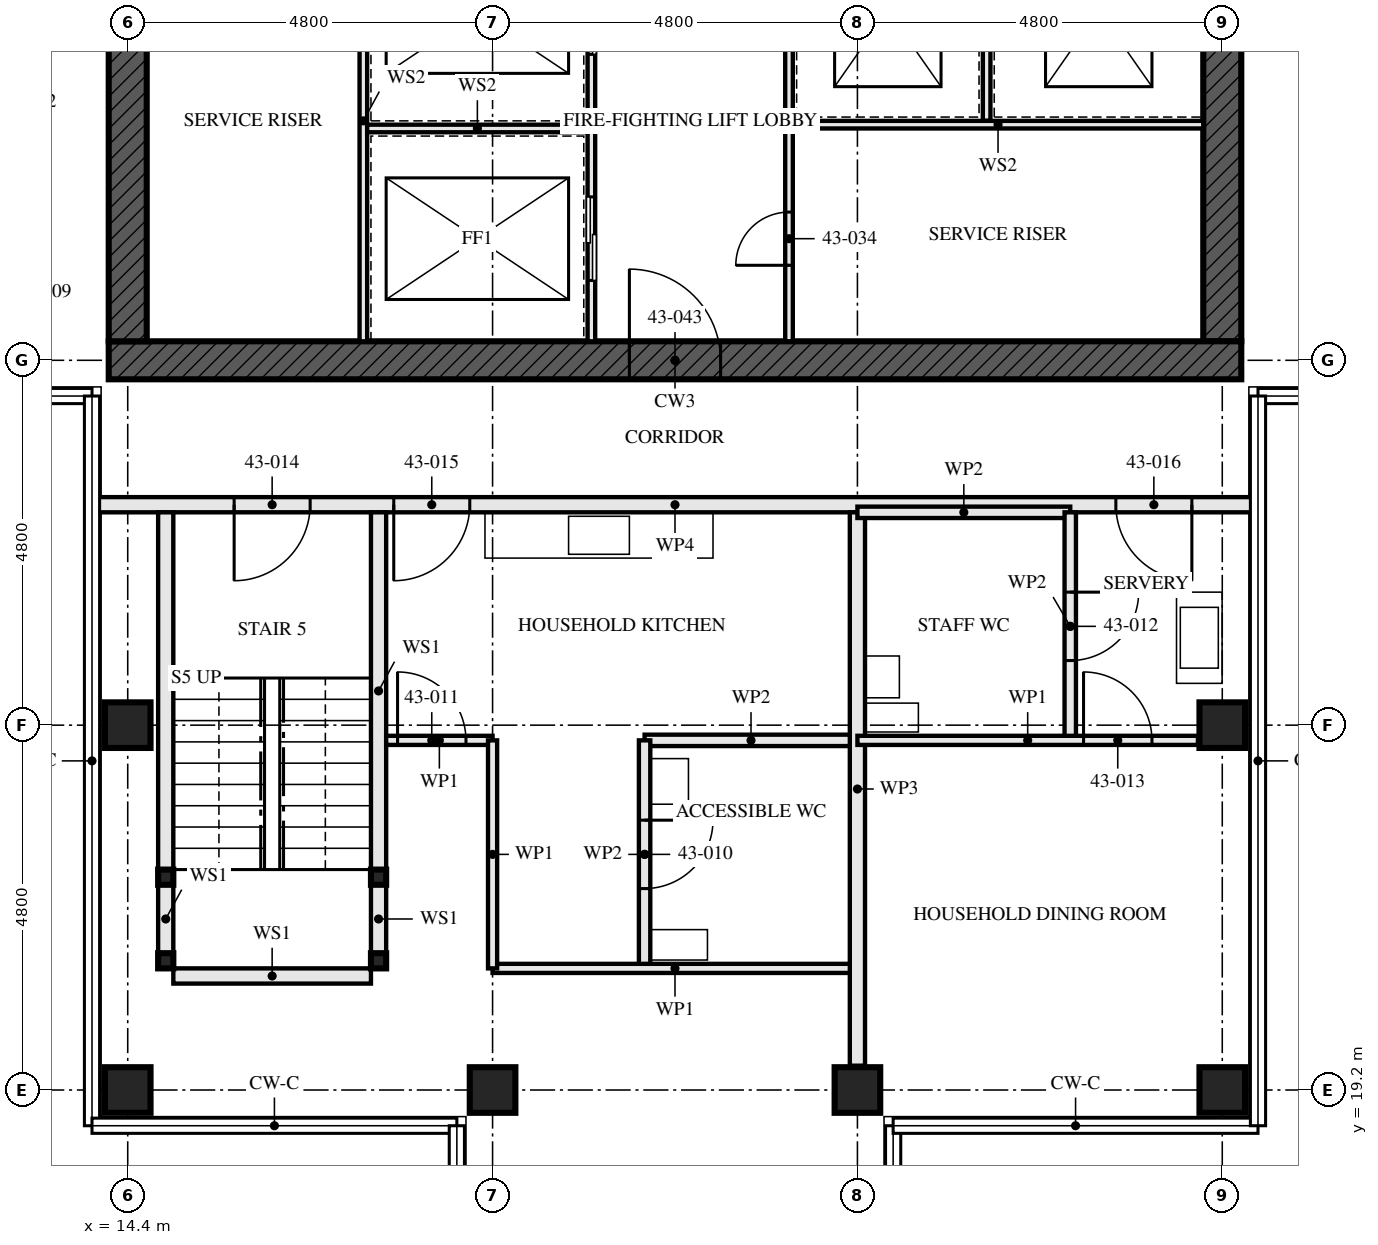
"""IFC4 building model, lengths in metres.
Left out: names, types, materials, properties, quantities, classifications, styles, units other than length and angle.
Written with IfcOpenShell. Run it as: python <this file> out.ifc"""

import sys

from ifc_helpers import new_model, si_unit, direction, frame, frame_2d, origin, origin_2d, place, context, subcontext, project, spatial, rectangle, hollow_rectangle, extrude, element, fill, save


model = new_model("IFC4")
c1 = context("Model", 3, precision=1e-05, world=origin(), true_north=direction((0.0, 1.0)))
c2 = subcontext(c1, "Body", "Model", "MODEL_VIEW")
j1 = project(units=[si_unit("LENGTHUNIT", "METRE"), si_unit("PLANEANGLEUNIT", "RADIAN")], contexts=[c1])
p1 = place(None, origin())
s1 = spatial("IfcSite", under=j1, at=p1, CompositionType="ELEMENT")
p2 = place(p1, origin())
s2 = spatial("IfcBuilding", under=s1, at=p2, CompositionType="ELEMENT")
p3 = place(p2, frame((0.0, 0.0, 158.5)))
s3 = spatial("IfcBuildingStorey", under=s2, at=p3, CompositionType="ELEMENT", Elevation=158.5)
p4 = place(p3, frame((14.4, 19.2, 0.0), z_axis=(0.0, 0.0, 1.0), x_axis=(0.0, 1.0, 0.0)))
e1 = element("IfcColumn", 1, at=p4, inside=s3, PredefinedType="COLUMN", context=c2, shape_type="SweptSolid", body=[
    extrude(hollow_rectangle(XDim=0.6, YDim=0.6, WallThickness=0.06, at=origin_2d()), origin(), (0.0, 0.0, 1.0), 3.5),
])
p5 = place(p3, frame((14.4, 24.0, 0.0), z_axis=(0.0, 0.0, 1.0), x_axis=(1.0, 0.0, 0.0)))
e2 = element("IfcColumn", 2, at=p5, inside=s3, PredefinedType="COLUMN", context=c2, shape_type="SweptSolid", body=[
    extrude(hollow_rectangle(XDim=0.6, YDim=0.6, WallThickness=0.08, at=origin_2d()), origin(), (0.0, 0.0, 1.0), 3.5),
])
for number, where, z_axis, x_axis in (
    (3, (19.2, 19.2, 0.0), (0.0, 0.0, 1.0), (0.0, 1.0, 0.0)),
    (4, (24.0, 19.2, 0.0), (0.0, 0.0, 1.0), (0.0, 1.0, 0.0)),
    (5, (28.8, 19.2, 0.0), (0.0, 0.0, 1.0), (0.0, 1.0, 0.0)),
):
    element("IfcColumn", number, at=place(p3, frame(where, z_axis=z_axis, x_axis=x_axis)), inside=s3, PredefinedType="COLUMN", context=c2, shape_type="SweptSolid", body=[
        extrude(hollow_rectangle(XDim=0.6, YDim=0.6, WallThickness=0.06, at=origin_2d()), origin(), (0.0, 0.0, 1.0), 3.5),
    ])
p6 = place(p3, frame((28.8, 24.0, 0.0), z_axis=(0.0, 0.0, 1.0), x_axis=(1.0, 0.0, 0.0)))
e6 = element("IfcColumn", 6, at=p6, inside=s3, PredefinedType="COLUMN", context=c2, shape_type="SweptSolid", body=[
    extrude(hollow_rectangle(XDim=0.6, YDim=0.6, WallThickness=0.08, at=origin_2d()), origin(), (0.0, 0.0, 1.0), 3.5),
])
p7 = place(p3, frame((14.15, 28.8, -0.17), z_axis=(0.0, 0.0, 1.0), x_axis=(1.0, 0.0, 0.0)))
e7 = element("IfcWall", 7, at=p7, inside=s3, PredefinedType="SHEAR", context=c2, shape_type="SweptSolid", body=[
    extrude(rectangle(XDim=14.9, YDim=0.5, at=frame_2d((7.45, 0.0))), origin(), (0.0, 0.0, 1.0), 3.5),
])
p8 = place(p7, frame((6.85, 0.0, 0.17)))
e8 = element("IfcOpeningElement", 8, at=p8, cuts=e7, PredefinedType="OPENING", context=c2, shape_type="SweptSolid", body=[
    extrude(rectangle(XDim=1.2, YDim=2.1, at=frame_2d((0.6, 1.05))), frame((0.0, 0.26, 0.0), z_axis=(0.0, -1.0, 0.0), x_axis=(1.0, 0.0, 0.0)), (0.0, 0.0, 1.0), 0.521),
])
p9 = place(p3, frame((14.4, 42.95, -0.17), z_axis=(0.0, 0.0, 1.0), x_axis=(0.0, -1.0, 0.0)))
e9 = element("IfcWall", 9, at=p9, inside=s3, PredefinedType="SHEAR", context=c2, shape_type="SweptSolid", body=[
    extrude(rectangle(XDim=13.9, YDim=0.5, at=frame_2d((6.95, 0.0))), origin(), (0.0, 0.0, 1.0), 3.5),
])
p10 = place(p9, frame((6.35, 0.0, 0.17)))
e10 = element("IfcOpeningElement", 10, at=p10, cuts=e9, PredefinedType="OPENING", context=c2, shape_type="SweptSolid", body=[
    extrude(rectangle(XDim=1.2, YDim=2.1, at=frame_2d((0.6, 1.05))), frame((0.0, 0.26, 0.0), z_axis=(0.0, -1.0, 0.0), x_axis=(1.0, 0.0, 0.0)), (0.0, 0.0, 1.0), 0.521),
])
p11 = place(p3, frame((28.8, 29.05, -0.17), z_axis=(0.0, 0.0, 1.0), x_axis=(0.0, 1.0, 0.0)))
e11 = element("IfcWall", 11, at=p11, inside=s3, PredefinedType="SHEAR", context=c2, shape_type="SweptSolid", body=[
    extrude(rectangle(XDim=13.9, YDim=0.5, at=frame_2d((6.95, 0.0))), origin(), (0.0, 0.0, 1.0), 3.5),
])
p12 = place(p11, frame((6.35, 0.0, 0.17)))
e12 = element("IfcOpeningElement", 12, at=p12, cuts=e11, PredefinedType="OPENING", context=c2, shape_type="SweptSolid", body=[
    extrude(rectangle(XDim=1.2, YDim=2.1, at=frame_2d((0.6, 1.05))), frame((0.0, 0.26, 0.0), z_axis=(0.0, -1.0, 0.0), x_axis=(1.0, 0.0, 0.0)), (0.0, 0.0, 1.0), 0.521),
])
for number, where, z_axis, x_axis in (
    (13, (14.9, 20.9, 0.0), (0.0, 0.0, 1.0), (1.0, 0.0, 0.0)),
    (14, (17.7, 20.9, 0.0), (0.0, 0.0, 1.0), (1.0, 0.0, 0.0)),
    (15, (14.9, 22.0, 0.0), (0.0, 0.0, 1.0), (1.0, 0.0, 0.0)),
    (16, (17.7, 22.0, 0.0), (0.0, 0.0, 1.0), (1.0, 0.0, 0.0)),
):
    element("IfcColumn", number, at=place(p3, frame(where, z_axis=z_axis, x_axis=x_axis)), inside=s3, PredefinedType="COLUMN", context=c2, shape_type="SweptSolid", body=[
        extrude(hollow_rectangle(XDim=0.2, YDim=0.2, WallThickness=0.008, at=origin_2d()), origin(), (0.0, 0.0, 1.0), 3.33),
    ])
p13 = place(p3, frame((14.9, 21.0, 0.0), z_axis=(0.0, 0.0, 1.0), x_axis=(0.0, 1.0, 0.0)))
e17 = element("IfcWall", 17, at=p13, inside=s3, PredefinedType="SOLIDWALL", context=c2, shape_type="SweptSolid", body=[
    extrude(rectangle(XDim=0.9, YDim=0.2, at=frame_2d((0.45, 0.0))), origin(), (0.0, 0.0, 1.0), 2.99),
])
p14 = place(p3, frame((14.9, 22.1, 0.0), z_axis=(0.0, 0.0, 1.0), x_axis=(0.0, 1.0, 0.0)))
e18 = element("IfcWall", 18, at=p14, inside=s3, PredefinedType="SOLIDWALL", context=c2, shape_type="SweptSolid", body=[
    extrude(rectangle(XDim=4.7, YDim=0.2, at=frame_2d((2.35, 0.0))), origin(), (0.0, 0.0, 1.0), 2.99),
])
p15 = place(p3, frame((17.7, 21.0, 0.0), z_axis=(0.0, 0.0, 1.0), x_axis=(0.0, 1.0, 0.0)))
e19 = element("IfcWall", 19, at=p15, inside=s3, PredefinedType="SOLIDWALL", context=c2, shape_type="SweptSolid", body=[
    extrude(rectangle(XDim=0.9, YDim=0.2, at=frame_2d((0.45, 0.0))), origin(), (0.0, 0.0, 1.0), 2.99),
])
p16 = place(p3, frame((17.7, 22.1, 0.0), z_axis=(0.0, 0.0, 1.0), x_axis=(0.0, 1.0, 0.0)))
e20 = element("IfcWall", 20, at=p16, inside=s3, PredefinedType="SOLIDWALL", context=c2, shape_type="SweptSolid", body=[
    extrude(rectangle(XDim=4.7, YDim=0.2, at=frame_2d((2.35, 0.0))), origin(), (0.0, 0.0, 1.0), 2.99),
])
p17 = place(p3, frame((15.0, 20.7, 0.0), z_axis=(0.0, 0.0, 1.0), x_axis=(1.0, 0.0, 0.0)))
e21 = element("IfcWall", 21, at=p17, inside=s3, PredefinedType="SOLIDWALL", context=c2, shape_type="SweptSolid", body=[
    extrude(rectangle(XDim=2.6, YDim=0.2, at=frame_2d((1.3, 0.0))), origin(), (0.0, 0.0, 1.0), 3.33),
])
p18 = place(p3, frame((21.2, 20.8, 0.0), z_axis=(0.0, 0.0, 1.0), x_axis=(0.0, 1.0, 0.0)))
e22 = element("IfcWall", 22, at=p18, inside=s3, PredefinedType="PARTITIONING", context=c2, shape_type="SweptSolid", body=[
    extrude(rectangle(XDim=3.0, YDim=0.15, at=frame_2d((1.5, 0.0))), origin(), (0.0, 0.0, 1.0), 3.33),
])
p19 = place(p18, frame((1.05, 0.0, 0.0)))
e23 = element("IfcOpeningElement", 23, at=p19, cuts=e22, PredefinedType="OPENING", context=c2, shape_type="SweptSolid", body=[
    extrude(rectangle(XDim=0.9, YDim=2.1, at=frame_2d((0.45, 1.05))), frame((0.0, 0.085, 0.0), z_axis=(0.0, -1.0, 0.0), x_axis=(1.0, 0.0, 0.0)), (0.0, 0.0, 1.0), 0.171),
])
p20 = place(p3, frame((21.2, 23.8, 0.0), z_axis=(0.0, 0.0, 1.0), x_axis=(1.0, 0.0, 0.0)))
e24 = element("IfcWall", 24, at=p20, inside=s3, PredefinedType="PARTITIONING", context=c2, shape_type="SweptSolid", body=[
    extrude(rectangle(XDim=2.8, YDim=0.15, at=frame_2d((1.4, 0.0))), origin(), (0.0, 0.0, 1.0), 3.33),
])
p21 = place(p3, frame((17.8, 23.8, 0.0), z_axis=(0.0, 0.0, 1.0), x_axis=(1.0, 0.0, 0.0)))
e25 = element("IfcWall", 25, at=p21, inside=s3, PredefinedType="PARTITIONING", context=c2, shape_type="SweptSolid", body=[
    extrude(rectangle(XDim=1.4, YDim=0.12, at=frame_2d((0.7, 0.0))), origin(), (0.0, 0.0, 1.0), 3.33),
])
p22 = place(p21, frame((0.15, 0.0, 0.0)))
e26 = element("IfcOpeningElement", 26, at=p22, cuts=e25, PredefinedType="OPENING", context=c2, shape_type="SweptSolid", body=[
    extrude(rectangle(XDim=0.9, YDim=2.1, at=frame_2d((0.45, 1.05))), frame((0.0, 0.071, 0.0), z_axis=(0.0, -1.0, 0.0), x_axis=(1.0, 0.0, 0.0)), (0.0, 0.0, 1.0), 0.141),
])
p23 = place(p3, frame((19.2, 20.8, 0.0), z_axis=(0.0, 0.0, 1.0), x_axis=(1.0, 0.0, 0.0)))
e27 = element("IfcWall", 27, at=p23, inside=s3, PredefinedType="PARTITIONING", context=c2, shape_type="SweptSolid", body=[
    extrude(rectangle(XDim=4.8, YDim=0.12, at=frame_2d((2.4, 0.0))), origin(), (0.0, 0.0, 1.0), 3.33),
])
p24 = place(p3, frame((19.2, 20.8, 0.0), z_axis=(0.0, 0.0, 1.0), x_axis=(0.0, 1.0, 0.0)))
e28 = element("IfcWall", 28, at=p24, inside=s3, PredefinedType="PARTITIONING", context=c2, shape_type="SweptSolid", body=[
    extrude(rectangle(XDim=3.0, YDim=0.12, at=frame_2d((1.5, 0.0))), origin(), (0.0, 0.0, 1.0), 2.55),
])
p25 = place(p3, frame((24.0, 19.52, 0.0), z_axis=(0.0, 0.0, 1.0), x_axis=(0.0, 1.0, 0.0)))
e29 = element("IfcWall", 29, at=p25, inside=s3, PredefinedType="PARTITIONING", context=c2, shape_type="SweptSolid", body=[
    extrude(rectangle(XDim=7.28, YDim=0.2, at=frame_2d((3.64, 0.0))), origin(), (0.0, 0.0, 1.0), 2.55),
])
p26 = place(p3, frame((26.8, 23.8, 0.0), z_axis=(0.0, 0.0, 1.0), x_axis=(0.0, 1.0, 0.0)))
e30 = element("IfcWall", 30, at=p26, inside=s3, PredefinedType="PARTITIONING", context=c2, shape_type="SweptSolid", body=[
    extrude(rectangle(XDim=3.0, YDim=0.15, at=frame_2d((1.5, 0.0))), origin(), (0.0, 0.0, 1.0), 2.55),
])
p27 = place(p26, frame((1.05, 0.0, 0.0)))
e31 = element("IfcOpeningElement", 31, at=p27, cuts=e30, PredefinedType="OPENING", context=c2, shape_type="SweptSolid", body=[
    extrude(rectangle(XDim=0.9, YDim=2.1, at=frame_2d((0.45, 1.05))), frame((0.0, 0.085, 0.0), z_axis=(0.0, -1.0, 0.0), x_axis=(1.0, 0.0, 0.0)), (0.0, 0.0, 1.0), 0.171),
])
p28 = place(p3, frame((24.0, 26.8, 0.0), z_axis=(0.0, 0.0, 1.0), x_axis=(1.0, 0.0, 0.0)))
e32 = element("IfcWall", 32, at=p28, inside=s3, PredefinedType="PARTITIONING", context=c2, shape_type="SweptSolid", body=[
    extrude(rectangle(XDim=2.8, YDim=0.15, at=frame_2d((1.4, 0.0))), origin(), (0.0, 0.0, 1.0), 3.33),
])
p29 = place(p3, frame((24.0, 23.8, 0.0), z_axis=(0.0, 0.0, 1.0), x_axis=(1.0, 0.0, 0.0)))
e33 = element("IfcWall", 33, at=p29, inside=s3, PredefinedType="PARTITIONING", context=c2, shape_type="SweptSolid", body=[
    extrude(rectangle(XDim=4.48, YDim=0.12, at=frame_2d((2.24, 0.0))), origin(), (0.0, 0.0, 1.0), 3.33),
])
p30 = place(p29, frame((2.975, 0.0, 0.0)))
e34 = element("IfcOpeningElement", 34, at=p30, cuts=e33, PredefinedType="OPENING", context=c2, shape_type="SweptSolid", body=[
    extrude(rectangle(XDim=0.9, YDim=2.1, at=frame_2d((0.45, 1.05))), frame((0.0, 0.071, 0.0), z_axis=(0.0, -1.0, 0.0), x_axis=(1.0, 0.0, 0.0)), (0.0, 0.0, 1.0), 0.141),
])
p31 = place(p3, frame((13.95, 26.9, 0.0), z_axis=(0.0, 0.0, 1.0), x_axis=(1.0, 0.0, 0.0)))
e35 = element("IfcWall", 35, at=p31, inside=s3, PredefinedType="PARTITIONING", context=c2, shape_type="SweptSolid", body=[
    extrude(rectangle(XDim=15.3, YDim=0.2, at=frame_2d((7.65, 0.0))), origin(), (0.0, 0.0, 1.0), 2.32),
])
p32 = place(p31, frame((1.85, 0.0, 0.0)))
e36 = element("IfcOpeningElement", 36, at=p32, cuts=e35, PredefinedType="OPENING", context=c2, shape_type="SweptSolid", body=[
    extrude(rectangle(XDim=1.0, YDim=2.1, at=frame_2d((0.5, 1.05))), frame((0.0, 0.111, 0.0), z_axis=(0.0, -1.0, 0.0), x_axis=(1.0, 0.0, 0.0)), (0.0, 0.0, 1.0), 0.221),
])
p33 = place(p31, frame((3.95, 0.0, 0.0)))
e37 = element("IfcOpeningElement", 37, at=p33, cuts=e35, PredefinedType="OPENING", context=c2, shape_type="SweptSolid", body=[
    extrude(rectangle(XDim=1.0, YDim=2.1, at=frame_2d((0.5, 1.05))), frame((0.0, 0.111, 0.0), z_axis=(0.0, -1.0, 0.0), x_axis=(1.0, 0.0, 0.0)), (0.0, 0.0, 1.0), 0.221),
])
p34 = place(p31, frame((13.45, 0.0, 0.0)))
e38 = element("IfcOpeningElement", 38, at=p34, cuts=e35, PredefinedType="OPENING", context=c2, shape_type="SweptSolid", body=[
    extrude(rectangle(XDim=1.0, YDim=2.1, at=frame_2d((0.5, 1.05))), frame((0.0, 0.111, 0.0), z_axis=(0.0, -1.0, 0.0), x_axis=(1.0, 0.0, 0.0)), (0.0, 0.0, 1.0), 0.221),
])
p35 = place(p3, frame((20.5, 29.05, 0.0), z_axis=(0.0, 0.0, 1.0), x_axis=(0.0, 1.0, 0.0)))
e39 = element("IfcWall", 39, at=p35, inside=s3, PredefinedType="SOLIDWALL", context=c2, shape_type="SweptSolid", body=[
    extrude(rectangle(XDim=5.8, YDim=0.1, at=frame_2d((2.9, 0.0))), origin(), (0.0, 0.0, 1.0), 3.33),
])
p36 = place(p35, frame((0.8, 0.0, 0.0)))
e40 = element("IfcOpeningElement", 40, at=p36, cuts=e39, PredefinedType="OPENING", context=c2, shape_type="SweptSolid", body=[
    extrude(rectangle(XDim=1.1, YDim=2.3, at=frame_2d((0.55, 1.15))), frame((0.0, 0.061, 0.0), z_axis=(0.0, -1.0, 0.0), x_axis=(1.0, 0.0, 0.0)), (0.0, 0.0, 1.0), 0.121),
])
p37 = place(p35, frame((3.775, 0.0, 0.0)))
e41 = element("IfcOpeningElement", 41, at=p37, cuts=e39, PredefinedType="OPENING", context=c2, shape_type="SweptSolid", body=[
    extrude(rectangle(XDim=1.1, YDim=2.3, at=frame_2d((0.55, 1.15))), frame((0.0, 0.061, 0.0), z_axis=(0.0, -1.0, 0.0), x_axis=(1.0, 0.0, 0.0)), (0.0, 0.0, 1.0), 0.121),
])
p38 = place(p3, frame((23.1, 29.05, 0.0), z_axis=(0.0, 0.0, 1.0), x_axis=(0.0, 1.0, 0.0)))
e42 = element("IfcWall", 42, at=p38, inside=s3, PredefinedType="SOLIDWALL", context=c2, shape_type="SweptSolid", body=[
    extrude(rectangle(XDim=5.8, YDim=0.1, at=frame_2d((2.9, 0.0))), origin(), (0.0, 0.0, 1.0), 3.33),
])
p39 = place(p38, frame((1.0, 0.0, 0.0)))
e43 = element("IfcOpeningElement", 43, at=p39, cuts=e42, PredefinedType="OPENING", context=c2, shape_type="SweptSolid", body=[
    extrude(rectangle(XDim=0.7, YDim=2.1, at=frame_2d((0.35, 1.05))), frame((0.0, 0.061, 0.0), z_axis=(0.0, -1.0, 0.0), x_axis=(1.0, 0.0, 0.0)), (0.0, 0.0, 1.0), 0.121),
])
p40 = place(p3, frame((17.5, 29.05, 0.0), z_axis=(0.0, 0.0, 1.0), x_axis=(0.0, 1.0, 0.0)))
e44 = element("IfcWall", 44, at=p40, inside=s3, PredefinedType="SOLIDWALL", context=c2, shape_type="SweptSolid", body=[
    extrude(rectangle(XDim=5.8, YDim=0.1, at=frame_2d((2.9, 0.0))), origin(), (0.0, 0.0, 1.0), 3.33),
])
p41 = place(p3, frame((17.55, 31.85, 0.0), z_axis=(0.0, 0.0, 1.0), x_axis=(1.0, 0.0, 0.0)))
e45 = element("IfcWall", 45, at=p41, inside=s3, PredefinedType="SOLIDWALL", context=c2, shape_type="SweptSolid", body=[
    extrude(rectangle(XDim=2.9, YDim=0.1, at=frame_2d((1.45, 0.0))), origin(), (0.0, 0.0, 1.0), 3.33),
])
p42 = place(p3, frame((25.7, 31.95, 0.0), z_axis=(0.0, 0.0, 1.0), x_axis=(0.0, 1.0, 0.0)))
e46 = element("IfcWall", 46, at=p42, inside=s3, PredefinedType="SOLIDWALL", context=c2, shape_type="SweptSolid", body=[
    extrude(rectangle(XDim=2.9, YDim=0.1, at=frame_2d((1.45, 0.0))), origin(), (0.0, 0.0, 1.0), 3.33),
])
p43 = place(p3, frame((23.15, 31.9, 0.0), z_axis=(0.0, 0.0, 1.0), x_axis=(1.0, 0.0, 0.0)))
e47 = element("IfcWall", 47, at=p43, inside=s3, PredefinedType="SOLIDWALL", context=c2, shape_type="SweptSolid", body=[
    extrude(rectangle(XDim=5.4, YDim=0.1, at=frame_2d((2.7, 0.0))), origin(), (0.0, 0.0, 1.0), 3.33),
])
p44 = place(p19, frame((0.9, 0.0, 0.0), z_axis=(0.0, 0.0, 1.0), x_axis=(-1.0, 0.0, 0.0)))
e48 = element("IfcDoor", 48, at=p44, inside=s3, OperationType="SINGLE_SWING_RIGHT", PredefinedType="DOOR", context=c2, shape_type="SweptSolid", body=[
    extrude(rectangle(XDim=0.9, YDim=2.1, at=frame_2d((0.45, 1.05))), frame((0.0, 0.022, 0.0), z_axis=(0.0, -1.0, 0.0), x_axis=(1.0, 0.0, 0.0)), (0.0, 0.0, 1.0), 0.044),
])
fill(e23, e48)
p45 = place(p22, origin())
e49 = element("IfcDoor", 49, at=p45, inside=s3, OperationType="SINGLE_SWING_RIGHT", PredefinedType="DOOR", context=c2, shape_type="SweptSolid", body=[
    extrude(rectangle(XDim=0.9, YDim=2.1, at=frame_2d((0.45, 1.05))), frame((0.0, 0.022, 0.0), z_axis=(0.0, -1.0, 0.0), x_axis=(1.0, 0.0, 0.0)), (0.0, 0.0, 1.0), 0.044),
])
fill(e26, e49)
p46 = place(p27, frame((0.9, 0.0, 0.0), z_axis=(0.0, 0.0, 1.0), x_axis=(-1.0, 0.0, 0.0)))
e50 = element("IfcDoor", 50, at=p46, inside=s3, OperationType="SINGLE_SWING_RIGHT", PredefinedType="DOOR", context=c2, shape_type="SweptSolid", body=[
    extrude(rectangle(XDim=0.9, YDim=2.1, at=frame_2d((0.45, 1.05))), frame((0.0, 0.022, 0.0), z_axis=(0.0, -1.0, 0.0), x_axis=(1.0, 0.0, 0.0)), (0.0, 0.0, 1.0), 0.044),
])
fill(e31, e50)
p47 = place(p30, origin())
e51 = element("IfcDoor", 51, at=p47, inside=s3, OperationType="SINGLE_SWING_RIGHT", PredefinedType="DOOR", context=c2, shape_type="SweptSolid", body=[
    extrude(rectangle(XDim=0.9, YDim=2.1, at=frame_2d((0.45, 1.05))), frame((0.0, 0.022, 0.0), z_axis=(0.0, -1.0, 0.0), x_axis=(1.0, 0.0, 0.0)), (0.0, 0.0, 1.0), 0.044),
])
fill(e34, e51)
p48 = place(p32, frame((1.0, 0.0, 0.0), z_axis=(0.0, 0.0, 1.0), x_axis=(-1.0, 0.0, 0.0)))
e52 = element("IfcDoor", 52, at=p48, inside=s3, OperationType="SINGLE_SWING_LEFT", PredefinedType="DOOR", context=c2, shape_type="SweptSolid", body=[
    extrude(rectangle(XDim=1.0, YDim=2.1, at=frame_2d((0.5, 1.05))), frame((0.0, 0.032, 0.0), z_axis=(0.0, -1.0, 0.0), x_axis=(1.0, 0.0, 0.0)), (0.0, 0.0, 1.0), 0.064),
])
fill(e36, e52)
p49 = place(p33, frame((1.0, 0.0, 0.0), z_axis=(0.0, 0.0, 1.0), x_axis=(-1.0, 0.0, 0.0)))
e53 = element("IfcDoor", 53, at=p49, inside=s3, OperationType="SINGLE_SWING_LEFT", PredefinedType="DOOR", context=c2, shape_type="SweptSolid", body=[
    extrude(rectangle(XDim=1.0, YDim=2.1, at=frame_2d((0.5, 1.05))), frame((0.0, 0.027, 0.0), z_axis=(0.0, -1.0, 0.0), x_axis=(1.0, 0.0, 0.0)), (0.0, 0.0, 1.0), 0.054),
])
fill(e37, e53)
p50 = place(p34, frame((1.0, 0.0, 0.0), z_axis=(0.0, 0.0, 1.0), x_axis=(-1.0, 0.0, 0.0)))
e54 = element("IfcDoor", 54, at=p50, inside=s3, OperationType="SINGLE_SWING_RIGHT", PredefinedType="DOOR", context=c2, shape_type="SweptSolid", body=[
    extrude(rectangle(XDim=1.0, YDim=2.1, at=frame_2d((0.5, 1.05))), frame((0.0, 0.027, 0.0), z_axis=(0.0, -1.0, 0.0), x_axis=(1.0, 0.0, 0.0)), (0.0, 0.0, 1.0), 0.054),
])
fill(e38, e54)
p51 = place(p36, origin())
e55 = element("IfcDoor", 55, at=p51, inside=s3, OperationType="SLIDING_TO_LEFT", PredefinedType="DOOR", context=c2, shape_type="SweptSolid", body=[
    extrude(rectangle(XDim=1.1, YDim=2.3, at=frame_2d((0.55, 1.15))), frame((0.0, 0.05, 0.0), z_axis=(0.0, -1.0, 0.0), x_axis=(1.0, 0.0, 0.0)), (0.0, 0.0, 1.0), 0.1),
])
fill(e40, e55)
p52 = place(p37, origin())
e56 = element("IfcDoor", 56, at=p52, inside=s3, OperationType="SLIDING_TO_LEFT", PredefinedType="DOOR", context=c2, shape_type="SweptSolid", body=[
    extrude(rectangle(XDim=1.1, YDim=2.3, at=frame_2d((0.55, 1.15))), frame((0.0, 0.05, 0.0), z_axis=(0.0, -1.0, 0.0), x_axis=(1.0, 0.0, 0.0)), (0.0, 0.0, 1.0), 0.1),
])
fill(e41, e56)
p53 = place(p39, origin())
e57 = element("IfcDoor", 57, at=p53, inside=s3, OperationType="SINGLE_SWING_RIGHT", PredefinedType="DOOR", context=c2, shape_type="SweptSolid", body=[
    extrude(rectangle(XDim=0.7, YDim=2.1, at=frame_2d((0.35, 1.05))), frame((0.0, 0.027, 0.0), z_axis=(0.0, -1.0, 0.0), x_axis=(1.0, 0.0, 0.0)), (0.0, 0.0, 1.0), 0.054),
])
fill(e43, e57)
p54 = place(p8, origin())
e58 = element("IfcDoor", 58, at=p54, inside=s3, OperationType="SINGLE_SWING_LEFT", PredefinedType="DOOR", context=c2, shape_type="SweptSolid", body=[
    extrude(rectangle(XDim=1.2, YDim=2.1, at=frame_2d((0.6, 1.05))), frame((0.0, 0.027, 0.0), z_axis=(0.0, -1.0, 0.0), x_axis=(1.0, 0.0, 0.0)), (0.0, 0.0, 1.0), 0.054),
])
fill(e8, e58)
save(model, sys.argv[1])
